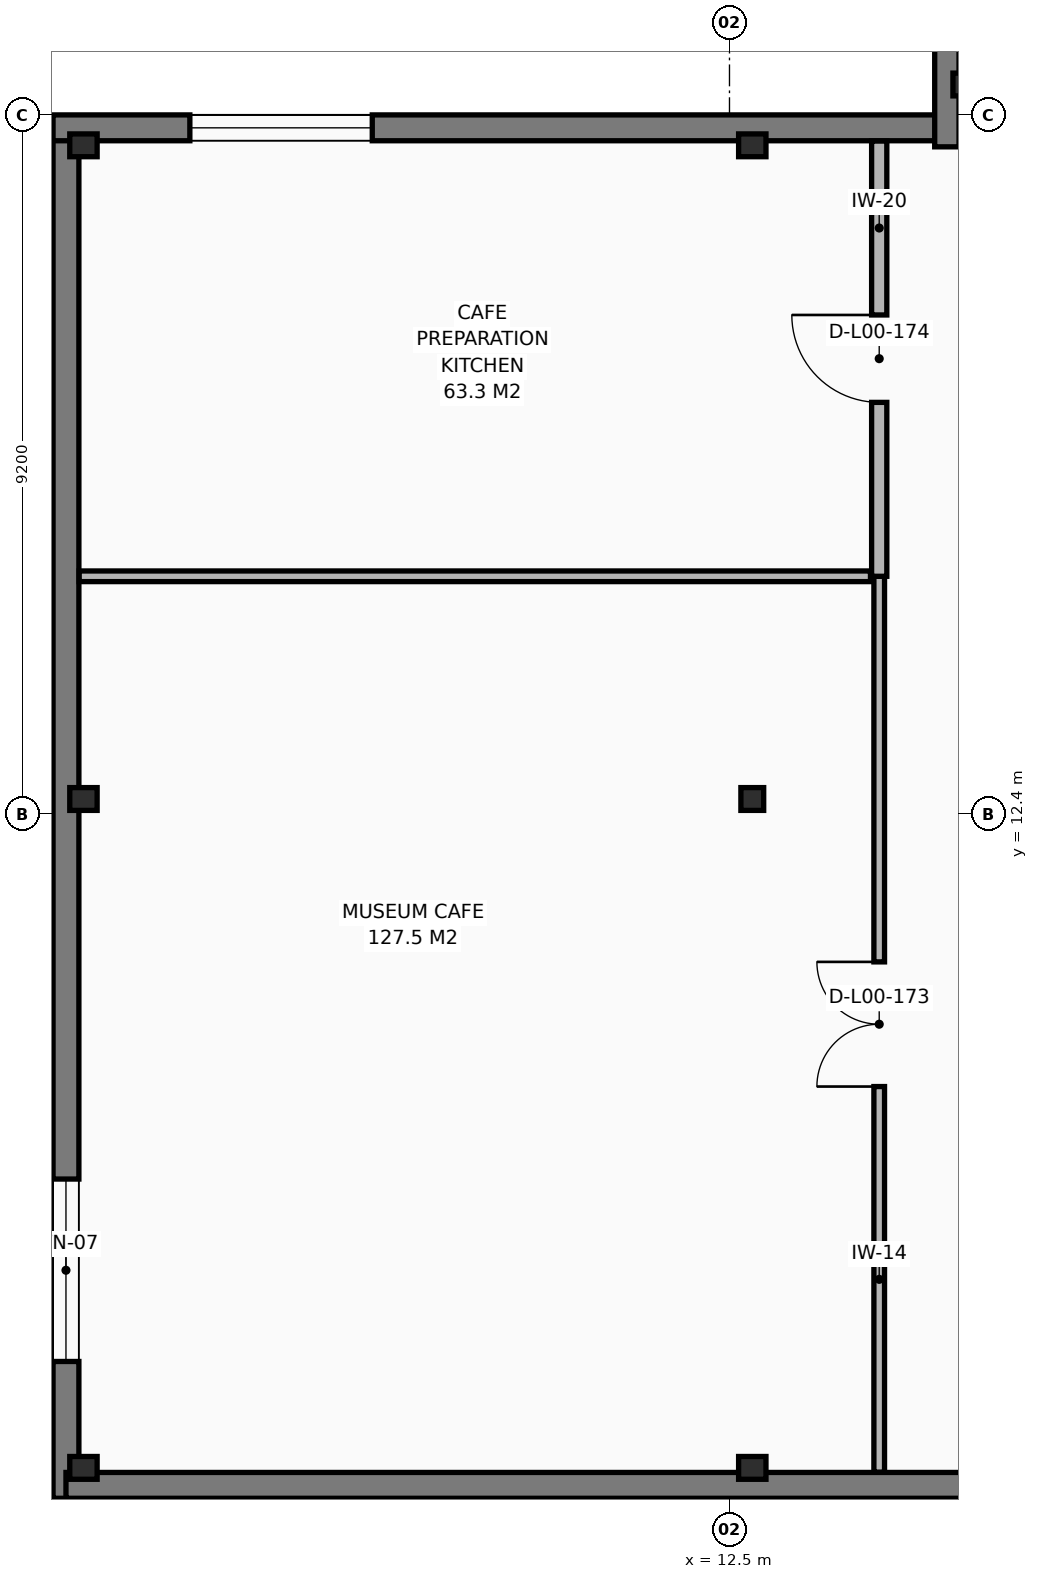
"""IFC4 building model, lengths in metres.
Left out: names, types, materials, properties, quantities, classifications, styles, units other than length and angle.
Written with IfcOpenShell. Run it as: python <this file> out.ifc"""

import sys

from ifc_helpers import new_model, si_unit, direction, frame, frame_2d, origin, origin_2d, place, context, subcontext, project, spatial, rectangle, i_section, extrude, element, fill, save


model = new_model("IFC4")
c1 = context("Model", 3, precision=1e-05, world=origin(), true_north=direction((0.0, 1.0)))
c2 = subcontext(c1, "Body", "Model", "MODEL_VIEW")
j1 = project(units=[si_unit("LENGTHUNIT", "METRE"), si_unit("PLANEANGLEUNIT", "RADIAN")], contexts=[c1])
p1 = place(None, origin())
s1 = spatial("IfcSite", under=j1, at=p1, CompositionType="ELEMENT")
p2 = place(p1, origin())
s2 = spatial("IfcBuilding", under=s1, at=p2, CompositionType="ELEMENT")
p3 = place(p2, origin())
s3 = spatial("IfcBuildingStorey", under=s2, at=p3, CompositionType="ELEMENT", Elevation=0.0)
for number, where, z_axis, x_axis in (
    (1, (4.0, 3.8, 0.0), (0.0, 0.0, 1.0), (1.0, 0.0, 0.0)),
    (2, (4.0, 12.6, 0.0), (0.0, 0.0, 1.0), (1.0, 0.0, 0.0)),
    (3, (4.0, 21.2, 0.0), (0.0, 0.0, 1.0), (1.0, 0.0, 0.0)),
    (4, (12.8, 3.8, 0.0), (0.0, 0.0, 1.0), (1.0, 0.0, 0.0)),
):
    element("IfcColumn", number, at=place(p3, frame(where, z_axis=z_axis, x_axis=x_axis)), inside=s3, PredefinedType="COLUMN", context=c2, shape_type="SweptSolid", body=[
        extrude(i_section(OverallWidth=0.3, OverallDepth=0.36, WebThickness=0.012, FlangeThickness=0.022, FilletRadius=0.027, at=origin_2d()), origin(), (0.0, 0.0, 1.0), 5.1),
    ])
p4 = place(p3, frame((12.8, 12.6, 0.0), z_axis=(0.0, 0.0, 1.0), x_axis=(1.0, 0.0, 0.0)))
e5 = element("IfcColumn", 5, at=p4, inside=s3, PredefinedType="COLUMN", context=c2, shape_type="SweptSolid", body=[
    extrude(i_section(OverallWidth=0.3, OverallDepth=0.3, WebThickness=0.011, FlangeThickness=0.019, FilletRadius=0.027, at=origin_2d()), origin(), (0.0, 0.0, 1.0), 5.1),
])
p5 = place(p3, frame((12.8, 21.2, 0.0), z_axis=(0.0, 0.0, 1.0), x_axis=(1.0, 0.0, 0.0)))
e6 = element("IfcColumn", 6, at=p5, inside=s3, PredefinedType="COLUMN", context=c2, shape_type="SweptSolid", body=[
    extrude(i_section(OverallWidth=0.3, OverallDepth=0.36, WebThickness=0.012, FlangeThickness=0.022, FilletRadius=0.027, at=origin_2d()), origin(), (0.0, 0.0, 1.0), 5.1),
])
p6 = place(p3, frame((15.6, 22.0, 0.0), z_axis=(0.0, 0.0, 1.0), x_axis=(1.0, 0.0, 0.0)))
e7 = element("IfcColumn", 7, at=p6, inside=s3, PredefinedType="COLUMN", context=c2, shape_type="SweptSolid", body=[
    extrude(i_section(OverallWidth=0.3, OverallDepth=0.32, WebThickness=0.011, FlangeThickness=0.021, FilletRadius=0.027, at=origin_2d()), origin(), (0.0, 0.0, 1.0), 5.1),
])
p7 = place(p3, frame((3.77, 3.4, 0.0), z_axis=(0.0, 0.0, 1.0), x_axis=(0.0, 1.0, 0.0)))
e8 = element("IfcWall", 8, at=p7, inside=s3, PredefinedType="SOLIDWALL", context=c2, shape_type="SweptSolid", body=[
    extrude(rectangle(XDim=18.03, YDim=0.34, at=frame_2d((9.015, 0.0))), origin(), (0.0, 0.0, 1.0), 4.88),
])
p8 = place(p7, frame((1.8, 0.0, 0.85)))
e9 = element("IfcOpeningElement", 9, at=p8, cuts=e8, PredefinedType="OPENING", context=c2, shape_type="SweptSolid", body=[
    extrude(rectangle(XDim=2.4, YDim=1.5, at=frame_2d((1.2, 0.75))), frame((0.0, 0.18, 0.0), z_axis=(0.0, -1.0, 0.0), x_axis=(1.0, 0.0, 0.0)), (0.0, 0.0, 1.0), 0.36),
])
p9 = place(p3, frame((3.6, 21.43, 0.0), z_axis=(0.0, 0.0, 1.0), x_axis=(1.0, 0.0, 0.0)))
e10 = element("IfcWall", 10, at=p9, inside=s3, PredefinedType="SOLIDWALL", context=c2, shape_type="SweptSolid", body=[
    extrude(rectangle(XDim=11.92, YDim=0.34, at=frame_2d((5.96, 0.0))), origin(), (0.0, 0.0, 1.0), 4.88),
])
p10 = place(p9, frame((1.8, 0.0, 0.85)))
e11 = element("IfcOpeningElement", 11, at=p10, cuts=e10, PredefinedType="OPENING", context=c2, shape_type="SweptSolid", body=[
    extrude(rectangle(XDim=2.4, YDim=1.5, at=frame_2d((1.2, 0.75))), frame((0.0, 0.18, 0.0), z_axis=(0.0, -1.0, 0.0), x_axis=(1.0, 0.0, 0.0)), (0.0, 0.0, 1.0), 0.36),
])
p11 = place(p3, frame((30.5, 3.57, 0.0), z_axis=(0.0, 0.0, 1.0), x_axis=(-1.0, 0.0, 0.0)))
e12 = element("IfcWall", 12, at=p11, inside=s3, PredefinedType="SOLIDWALL", context=c2, shape_type="SweptSolid", body=[
    extrude(rectangle(XDim=26.73, YDim=0.34, at=frame_2d((13.365, 0.0))), origin(), (0.0, 0.0, 1.0), 4.88),
])
p12 = place(p11, frame((1.8, 0.0, 0.85)))
e13 = element("IfcOpeningElement", 13, at=p12, cuts=e12, PredefinedType="OPENING", context=c2, shape_type="SweptSolid", body=[
    extrude(rectangle(XDim=2.4, YDim=1.5, at=frame_2d((1.2, 0.75))), frame((0.0, 0.18, 0.0), z_axis=(0.0, -1.0, 0.0), x_axis=(1.0, 0.0, 0.0)), (0.0, 0.0, 1.0), 0.36),
])
p13 = place(p3, frame((15.36, 21.18, 0.0), z_axis=(0.0, 0.0, 1.0), x_axis=(0.0, 1.0, 0.0)))
e14 = element("IfcWall", 14, at=p13, inside=s3, PredefinedType="SOLIDWALL", context=c2, shape_type="SweptSolid", body=[
    extrude(rectangle(XDim=18.565, YDim=0.32, at=frame_2d((9.283, 0.0))), origin(), (0.0, 0.0, 1.0), 4.82),
])
p14 = place(p13, frame((8.308, 0.0, 1.12)))
e15 = element("IfcOpeningElement", 15, at=p14, cuts=e14, PredefinedType="OPENING", context=c2, shape_type="SweptSolid", body=[
    extrude(rectangle(XDim=1.95, YDim=1.5, at=frame_2d((0.975, 0.75))), frame((0.0, 0.17, 0.0), z_axis=(0.0, -1.0, 0.0), x_axis=(1.0, 0.0, 0.0)), (0.0, 0.0, 1.0), 0.34),
])
p15 = place(p3, frame((14.47, 3.744, 0.0), z_axis=(0.0, 0.0, 1.0), x_axis=(0.0, 1.0, 0.0)))
e16 = element("IfcWall", 16, at=p15, inside=s3, PredefinedType="PARTITIONING", context=c2, shape_type="SweptSolid", body=[
    extrude(rectangle(XDim=11.786, YDim=0.14, at=frame_2d((5.893, 0.0))), origin(), (0.0, 0.0, 1.0), 4.51),
])
p16 = place(p15, frame((5.073, 0.0, 0.0)))
e17 = element("IfcOpeningElement", 17, at=p16, cuts=e16, PredefinedType="OPENING", context=c2, shape_type="SweptSolid", body=[
    extrude(rectangle(XDim=1.64, YDim=2.2, at=frame_2d((0.82, 1.1))), frame((0.0, 0.08, 0.0), z_axis=(0.0, -1.0, 0.0), x_axis=(1.0, 0.0, 0.0)), (0.0, 0.0, 1.0), 0.16),
])
p17 = place(p3, frame((14.47, 15.53, 0.0), z_axis=(0.0, 0.0, 1.0), x_axis=(0.0, 1.0, 0.0)))
e18 = element("IfcWall", 18, at=p17, inside=s3, PredefinedType="PARTITIONING", context=c2, shape_type="SweptSolid", body=[
    extrude(rectangle(XDim=5.726, YDim=0.2, at=frame_2d((2.863, 0.0))), origin(), (0.0, 0.0, 1.0), 4.51),
])
p18 = place(p17, frame((2.288, 0.0, 0.0)))
e19 = element("IfcOpeningElement", 19, at=p18, cuts=e18, PredefinedType="OPENING", context=c2, shape_type="SweptSolid", body=[
    extrude(rectangle(XDim=1.15, YDim=2.15, at=frame_2d((0.575, 1.075))), frame((0.0, 0.11, 0.0), z_axis=(0.0, -1.0, 0.0), x_axis=(1.0, 0.0, 0.0)), (0.0, 0.0, 1.0), 0.22),
])
p19 = place(p3, frame((3.944, 15.53, 0.0), z_axis=(0.0, 0.0, 1.0), x_axis=(1.0, 0.0, 0.0)))
e20 = element("IfcWall", 20, at=p19, inside=s3, PredefinedType="PARTITIONING", context=c2, shape_type="SweptSolid", body=[
    extrude(rectangle(XDim=10.411, YDim=0.14, at=frame_2d((5.206, 0.0))), origin(), (0.0, 0.0, 1.0), 4.51),
])
p20 = place(p8, origin())
e21 = element("IfcWindow", 21, at=p20, inside=s3, PartitioningType="SINGLE_PANEL", PredefinedType="WINDOW", context=c2, shape_type="SweptSolid", body=[
    extrude(rectangle(XDim=2.4, YDim=1.5, at=frame_2d((1.2, 0.75))), frame((0.0, 0.03, 0.0), z_axis=(0.0, -1.0, 0.0), x_axis=(1.0, 0.0, 0.0)), (0.0, 0.0, 1.0), 0.06),
])
fill(e9, e21)
p21 = place(p10, origin())
e22 = element("IfcWindow", 22, at=p21, inside=s3, PartitioningType="SINGLE_PANEL", PredefinedType="WINDOW", context=c2, shape_type="SweptSolid", body=[
    extrude(rectangle(XDim=2.4, YDim=1.5, at=frame_2d((1.2, 0.75))), frame((0.0, 0.03, 0.0), z_axis=(0.0, -1.0, 0.0), x_axis=(1.0, 0.0, 0.0)), (0.0, 0.0, 1.0), 0.06),
])
fill(e11, e22)
p22 = place(p16, origin())
e23 = element("IfcDoor", 23, at=p22, inside=s3, OperationType="DOUBLE_DOOR_SINGLE_SWING", PredefinedType="DOOR", context=c2, shape_type="SweptSolid", body=[
    extrude(rectangle(XDim=1.64, YDim=2.2, at=frame_2d((0.82, 1.1))), frame((0.0, 0.025, 0.0), z_axis=(0.0, -1.0, 0.0), x_axis=(1.0, 0.0, 0.0)), (0.0, 0.0, 1.0), 0.05),
])
fill(e17, e23)
p23 = place(p18, origin())
e24 = element("IfcDoor", 24, at=p23, inside=s3, OperationType="SINGLE_SWING_RIGHT", PredefinedType="DOOR", context=c2, shape_type="SweptSolid", body=[
    extrude(rectangle(XDim=1.15, YDim=2.15, at=frame_2d((0.575, 1.075))), frame((0.0, 0.025, 0.0), z_axis=(0.0, -1.0, 0.0), x_axis=(1.0, 0.0, 0.0)), (0.0, 0.0, 1.0), 0.05),
])
fill(e19, e24)
save(model, sys.argv[1])
